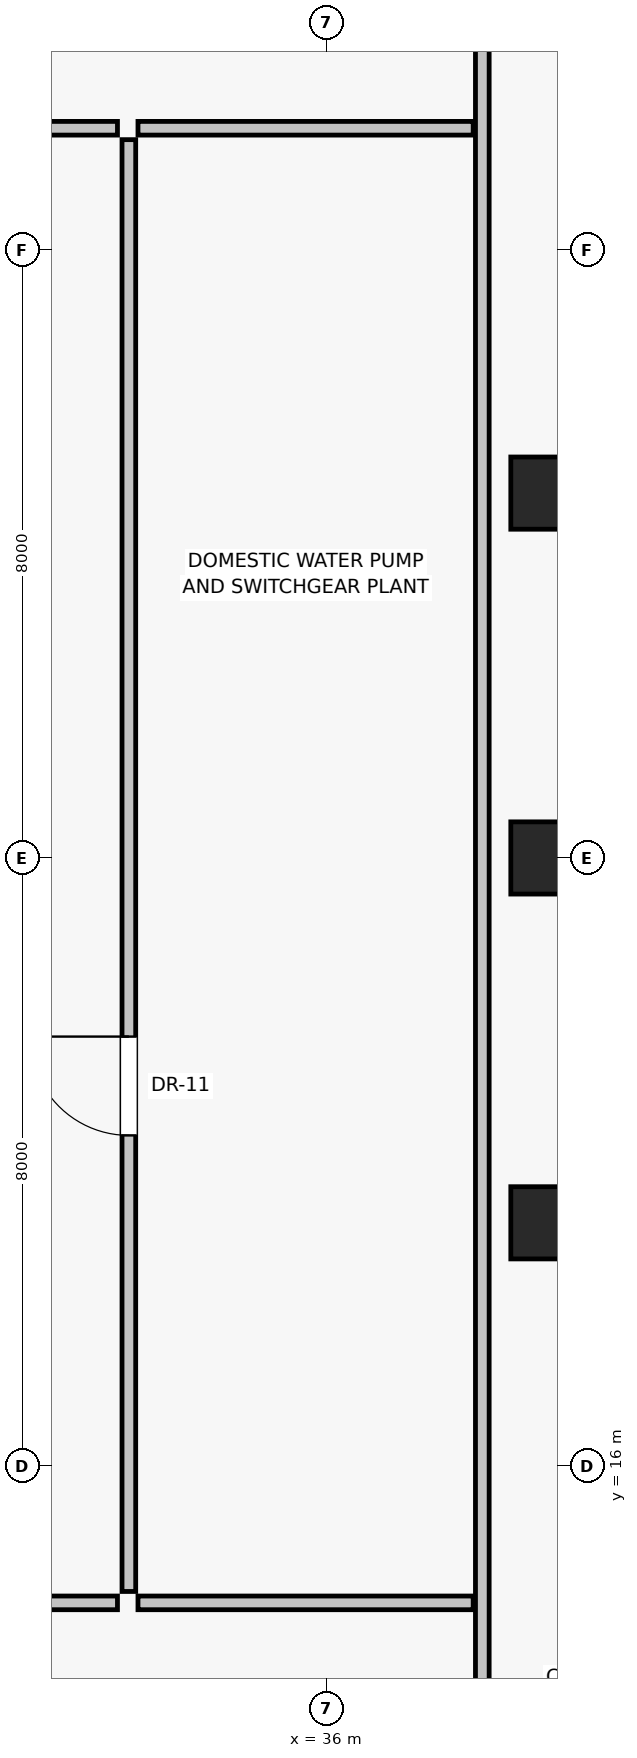
"""IFC4 building model, lengths in metres.
Left out: names, types, materials, properties, quantities, classifications, styles, units other than length and angle.
Written with IfcOpenShell. Run it as: python <this file> out.ifc"""

import sys

from ifc_helpers import new_model, si_unit, direction, frame, frame_2d, origin, origin_2d, place, context, subcontext, project, spatial, rectangle, extrude, source, transform, mapped, element, fill, save


model = new_model("IFC4")
c1 = context("Model", 3, precision=1e-05, world=origin(), true_north=direction((0.0, 1.0)))
c2 = subcontext(c1, "Body", "Model", "MODEL_VIEW")
j1 = project(units=[si_unit("LENGTHUNIT", "METRE"), si_unit("PLANEANGLEUNIT", "RADIAN")], contexts=[c1])
p1 = place(None, origin())
s1 = spatial("IfcSite", under=j1, at=p1, CompositionType="ELEMENT")
p2 = place(p1, origin())
s2 = spatial("IfcBuilding", under=s1, at=p2, CompositionType="ELEMENT")
p3 = place(p2, frame((0.0, 0.0, 225.4)))
s3 = spatial("IfcBuildingStorey", under=s2, at=p3, CompositionType="ELEMENT", Elevation=225.4)
for number, where, z_axis, x_axis in (
    (1, (38.9, 19.2, 0.0), (0.0, 0.0, 1.0), (1.0, 0.0, 0.0)),
    (2, (38.9, 24.0, 0.0), (0.0, 0.0, 1.0), (1.0, 0.0, 0.0)),
    (3, (38.9, 28.8, 0.0), (0.0, 0.0, 1.0), (1.0, 0.0, 0.0)),
):
    element("IfcColumn", number, at=place(p3, frame(where, z_axis=z_axis, x_axis=x_axis)), inside=s3, PredefinedType="COLUMN", context=c2, shape_type="SweptSolid", body=[
        extrude(rectangle(XDim=0.95, YDim=0.95, at=origin_2d()), origin(), (0.0, 0.0, 1.0), 4.65),
    ])
p4 = place(p3, frame((14.75, 14.2, 0.0), z_axis=(0.0, 0.0, 1.0), x_axis=(1.0, 0.0, 0.0)))
e4 = element("IfcWall", 4, at=p4, inside=s3, PredefinedType="PARTITIONING", context=c2, shape_type="SweptSolid", body=[
    extrude(rectangle(XDim=18.5, YDim=0.18, at=frame_2d((9.25, 0.0))), origin(), (0.0, 0.0, 1.0), 4.415),
])
p5 = place(p4, frame((6.0, 0.0, 0.0)))
e5 = element("IfcOpeningElement", 5, at=p5, cuts=e4, PredefinedType="OPENING", context=c2, shape_type="SweptSolid", body=[
    extrude(rectangle(XDim=1.1, YDim=2.03, at=frame_2d((0.55, 1.015))), frame((0.0, 0.1, 0.0), z_axis=(0.0, -1.0, 0.0), x_axis=(1.0, 0.0, 0.0)), (0.0, 0.0, 1.0), 0.2),
])
p6 = place(p3, frame((33.4, 14.35, 0.0), z_axis=(0.0, 0.0, 1.0), x_axis=(0.0, 1.0, 0.0)))
e6 = element("IfcWall", 6, at=p6, inside=s3, PredefinedType="PARTITIONING", context=c2, shape_type="SweptSolid", body=[
    extrude(rectangle(XDim=19.1, YDim=0.18, at=frame_2d((9.55, 0.0))), origin(), (0.0, 0.0, 1.0), 4.415),
])
p7 = place(p6, frame((6.0, 0.0, 0.0)))
e7 = element("IfcOpeningElement", 7, at=p7, cuts=e6, PredefinedType="OPENING", context=c2, shape_type="SweptSolid", body=[
    extrude(rectangle(XDim=1.3, YDim=2.3, at=frame_2d((0.65, 1.15))), frame((0.0, 0.1, 0.0), z_axis=(0.0, -1.0, 0.0), x_axis=(1.0, 0.0, 0.0)), (0.0, 0.0, 1.0), 0.2),
])
p8 = place(p3, frame((14.75, 33.6, 0.0), z_axis=(0.0, 0.0, 1.0), x_axis=(1.0, 0.0, 0.0)))
e8 = element("IfcWall", 8, at=p8, inside=s3, PredefinedType="PARTITIONING", context=c2, shape_type="SweptSolid", body=[
    extrude(rectangle(XDim=18.5, YDim=0.18, at=frame_2d((9.25, 0.0))), origin(), (0.0, 0.0, 1.0), 4.415),
])
p9 = place(p8, frame((6.0, 0.0, 0.0)))
e9 = element("IfcOpeningElement", 9, at=p9, cuts=e8, PredefinedType="OPENING", context=c2, shape_type="SweptSolid", body=[
    extrude(rectangle(XDim=1.1, YDim=2.03, at=frame_2d((0.55, 1.015))), frame((0.0, 0.1, 0.0), z_axis=(0.0, -1.0, 0.0), x_axis=(1.0, 0.0, 0.0)), (0.0, 0.0, 1.0), 0.2),
])
p10 = place(p3, frame((38.05, 10.07, 0.0), z_axis=(0.0, 0.0, 1.0), x_axis=(0.0, 1.0, 0.0)))
e10 = element("IfcWall", 10, at=p10, inside=s3, PredefinedType="PARTITIONING", context=c2, shape_type="SweptSolid", body=[
    extrude(rectangle(XDim=27.86, YDim=0.18, at=frame_2d((13.93, 0.0))), origin(), (0.0, 0.0, 1.0), 2.215),
])
for number, where, z_axis, x_axis in (
    (11, (33.52, 14.2, 0.0), (0.0, 0.0, 1.0), (1.0, 0.0, 0.0)),
    (12, (33.52, 33.6, 0.0), (0.0, 0.0, 1.0), (1.0, 0.0, 0.0)),
):
    element("IfcWall", number, at=place(p3, frame(where, z_axis=z_axis, x_axis=x_axis)), inside=s3, PredefinedType="PARTITIONING", context=c2, shape_type="SweptSolid", body=[
        extrude(rectangle(XDim=4.41, YDim=0.18, at=frame_2d((2.205, 0.0))), origin(), (0.0, 0.0, 1.0), 4.415),
    ])
m1 = source(origin(), c2, "Body", "SweptSolid", [
    extrude(rectangle(XDim=1.3, YDim=2.3, at=frame_2d((0.65, 1.15))), frame((0.0, 0.025, 0.0), z_axis=(0.0, -1.0, 0.0), x_axis=(1.0, 0.0, 0.0)), (0.0, 0.0, 1.0), 0.05),
])
p11 = place(p7, origin())
e13 = element("IfcDoor", 13, at=p11, inside=s3, OperationType="SINGLE_SWING_RIGHT", PredefinedType="DOOR", context=c2, shape_type="MappedRepresentation", body=[
    mapped(m1, transform((0.0, 0.0, 0.0), scale=1.0)),
])
fill(e7, e13)
save(model, sys.argv[1])
